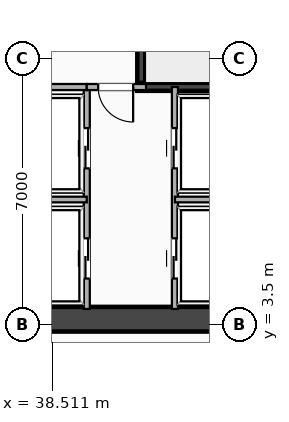
"""IFC4 building model, lengths in metres.
Left out: names, types, materials, properties, quantities, classifications, styles, units other than length and angle.
Written with IfcOpenShell. Run it as: python <this file> out.ifc"""

import sys

from ifc_helpers import new_model, si_unit, direction, frame, frame_2d, origin, place, context, subcontext, project, spatial, rectangle, extrude, element, fill, save


model = new_model("IFC4")
c1 = context("Model", 3, precision=1e-05, world=origin(), true_north=direction((0.0, 1.0)))
c2 = subcontext(c1, "Body", "Model", "MODEL_VIEW")
j1 = project(units=[si_unit("LENGTHUNIT", "METRE"), si_unit("PLANEANGLEUNIT", "RADIAN")], contexts=[c1])
p1 = place(None, origin())
s1 = spatial("IfcSite", under=j1, at=p1, CompositionType="ELEMENT")
p2 = place(p1, origin())
s2 = spatial("IfcBuilding", under=s1, at=p2, CompositionType="ELEMENT")
p3 = place(p2, origin())
s3 = spatial("IfcBuildingStorey", under=s2, at=p3, CompositionType="ELEMENT", Elevation=0.0)
p4 = place(p3, frame((20.3, 3.63, 0.0), z_axis=(0.0, 0.0, 1.0), x_axis=(1.0, 0.0, 0.0)))
e1 = element("IfcWall", 1, at=p4, inside=s3, PredefinedType="SHEAR", context=c2, shape_type="SweptSolid", body=[
    extrude(rectangle(XDim=24.5, YDim=0.65, at=frame_2d((12.25, 0.0))), origin(), (0.0, 0.0, 1.0), 5.1),
])
p5 = place(p4, frame((13.45, 0.0, 0.0), z_axis=(0.0, 0.0, 1.0), x_axis=(-1.0, 0.0, 0.0)))
e2 = element("IfcOpeningElement", 2, at=p5, cuts=e1, PredefinedType="OPENING", context=c2, shape_type="SweptSolid", body=[
    extrude(rectangle(XDim=1.1, YDim=2.15, at=frame_2d((0.55, 1.075))), frame((0.0, 0.335, 0.0), z_axis=(0.0, -1.0, 0.0), x_axis=(1.0, 0.0, 0.0)), (0.0, 0.0, 1.0), 0.67),
])
p6 = place(p3, frame((40.855, 9.745, 0.0), z_axis=(0.0, 0.0, 1.0), x_axis=(0.0, 1.0, 0.0)))
e3 = element("IfcWall", 3, at=p6, inside=s3, PredefinedType="SHEAR", context=c2, shape_type="SweptSolid", body=[
    extrude(rectangle(XDim=8.01, YDim=0.21, at=frame_2d((4.005, 0.0))), origin(), (0.0, 0.0, 1.0), 5.1),
])
p7 = place(p3, frame((40.75, 9.745, 0.0), z_axis=(0.0, 0.0, 1.0), x_axis=(1.0, 0.0, 0.0)))
e4 = element("IfcWall", 4, at=p7, inside=s3, PredefinedType="SHEAR", context=c2, shape_type="SweptSolid", body=[
    extrude(rectangle(XDim=3.66, YDim=0.21, at=frame_2d((1.83, 0.0))), origin(), (0.0, 0.0, 1.0), 5.1),
])
p8 = place(p3, frame((39.42, 3.9, 0.0), z_axis=(0.0, 0.0, 1.0), x_axis=(0.0, 1.0, 0.0)))
e5 = element("IfcWall", 5, at=p8, inside=s3, PredefinedType="PARTITIONING", context=c2, shape_type="SweptSolid", body=[
    extrude(rectangle(XDim=5.84, YDim=0.16, at=frame_2d((2.92, 0.0))), origin(), (0.0, 0.0, 1.0), 4.164),
])
p9 = place(p8, frame((1.86, 0.0, 0.0), z_axis=(0.0, 0.0, 1.0), x_axis=(-1.0, 0.0, 0.0)))
e6 = element("IfcOpeningElement", 6, at=p9, cuts=e5, PredefinedType="OPENING", context=c2, shape_type="SweptSolid", body=[
    extrude(rectangle(XDim=1.06, YDim=2.16, at=frame_2d((0.53, 1.08))), frame((0.0, 0.09, 0.0), z_axis=(0.0, -1.0, 0.0), x_axis=(1.0, 0.0, 0.0)), (0.0, 0.0, 1.0), 0.18),
])
p10 = place(p8, frame((4.76, 0.0, 0.0), z_axis=(0.0, 0.0, 1.0), x_axis=(-1.0, 0.0, 0.0)))
e7 = element("IfcOpeningElement", 7, at=p10, cuts=e5, PredefinedType="OPENING", context=c2, shape_type="SweptSolid", body=[
    extrude(rectangle(XDim=1.06, YDim=2.16, at=frame_2d((0.53, 1.08))), frame((0.0, 0.09, 0.0), z_axis=(0.0, -1.0, 0.0), x_axis=(1.0, 0.0, 0.0)), (0.0, 0.0, 1.0), 0.18),
])
p11 = place(p3, frame((41.74, 3.9, 0.0), z_axis=(0.0, 0.0, 1.0), x_axis=(0.0, 1.0, 0.0)))
e8 = element("IfcWall", 8, at=p11, inside=s3, PredefinedType="PARTITIONING", context=c2, shape_type="SweptSolid", body=[
    extrude(rectangle(XDim=5.84, YDim=0.16, at=frame_2d((2.92, 0.0))), origin(), (0.0, 0.0, 1.0), 4.164),
])
p12 = place(p11, frame((0.8, 0.0, 0.0)))
e9 = element("IfcOpeningElement", 9, at=p12, cuts=e8, PredefinedType="OPENING", context=c2, shape_type="SweptSolid", body=[
    extrude(rectangle(XDim=1.06, YDim=2.16, at=frame_2d((0.53, 1.08))), frame((0.0, 0.09, 0.0), z_axis=(0.0, -1.0, 0.0), x_axis=(1.0, 0.0, 0.0)), (0.0, 0.0, 1.0), 0.18),
])
p13 = place(p11, frame((3.7, 0.0, 0.0)))
e10 = element("IfcOpeningElement", 10, at=p13, cuts=e8, PredefinedType="OPENING", context=c2, shape_type="SweptSolid", body=[
    extrude(rectangle(XDim=1.06, YDim=2.16, at=frame_2d((0.53, 1.08))), frame((0.0, 0.09, 0.0), z_axis=(0.0, -1.0, 0.0), x_axis=(1.0, 0.0, 0.0)), (0.0, 0.0, 1.0), 0.18),
])
p14 = place(p3, frame((37.25, 6.78, 0.0), z_axis=(0.0, 0.0, 1.0), x_axis=(1.0, 0.0, 0.0)))
e11 = element("IfcWall", 11, at=p14, inside=s3, PredefinedType="PARTITIONING", context=c2, shape_type="SweptSolid", body=[
    extrude(rectangle(XDim=2.17, YDim=0.15, at=frame_2d((1.085, 0.0))), origin(), (0.0, 0.0, 1.0), 4.23),
])
p15 = place(p3, frame((41.74, 6.78, 0.0), z_axis=(0.0, 0.0, 1.0), x_axis=(1.0, 0.0, 0.0)))
e12 = element("IfcWall", 12, at=p15, inside=s3, PredefinedType="PARTITIONING", context=c2, shape_type="SweptSolid", body=[
    extrude(rectangle(XDim=2.66, YDim=0.15, at=frame_2d((1.33, 0.0))), origin(), (0.0, 0.0, 1.0), 4.23),
])
p16 = place(p3, frame((37.25, 9.74, 0.0), z_axis=(0.0, 0.0, 1.0), x_axis=(1.0, 0.0, 0.0)))
e13 = element("IfcWall", 13, at=p16, inside=s3, PredefinedType="PARTITIONING", context=c2, shape_type="SweptSolid", body=[
    extrude(rectangle(XDim=2.17, YDim=0.16, at=frame_2d((1.085, 0.0))), origin(), (0.0, 0.0, 1.0), 4.23),
])
p17 = place(p3, frame((39.42, 9.74, 0.0), z_axis=(0.0, 0.0, 1.0), x_axis=(1.0, 0.0, 0.0)))
e14 = element("IfcWall", 14, at=p17, inside=s3, PredefinedType="PARTITIONING", context=c2, shape_type="SweptSolid", body=[
    extrude(rectangle(XDim=1.56, YDim=0.16, at=frame_2d((0.78, 0.0))), origin(), (0.0, 0.0, 1.0), 5.1),
])
p18 = place(p17, frame((0.3, 0.0, 0.0)))
e15 = element("IfcOpeningElement", 15, at=p18, cuts=e14, PredefinedType="OPENING", context=c2, shape_type="SweptSolid", body=[
    extrude(rectangle(XDim=0.92, YDim=2.08, at=frame_2d((0.46, 1.04))), frame((0.0, 0.09, 0.0), z_axis=(0.0, -1.0, 0.0), x_axis=(1.0, 0.0, 0.0)), (0.0, 0.0, 1.0), 0.18),
])
p19 = place(p9, origin())
e16 = element("IfcDoor", 16, at=p19, inside=s3, OperationType="DOUBLE_DOOR_SLIDING", PredefinedType="DOOR", context=c2, shape_type="SweptSolid", body=[
    extrude(rectangle(XDim=1.06, YDim=2.16, at=frame_2d((0.53, 1.08))), frame((0.0, 0.025, 0.0), z_axis=(0.0, -1.0, 0.0), x_axis=(1.0, 0.0, 0.0)), (0.0, 0.0, 1.0), 0.05),
])
fill(e6, e16)
p20 = place(p10, origin())
e17 = element("IfcDoor", 17, at=p20, inside=s3, OperationType="DOUBLE_DOOR_SLIDING", PredefinedType="DOOR", context=c2, shape_type="SweptSolid", body=[
    extrude(rectangle(XDim=1.06, YDim=2.16, at=frame_2d((0.53, 1.08))), frame((0.0, 0.025, 0.0), z_axis=(0.0, -1.0, 0.0), x_axis=(1.0, 0.0, 0.0)), (0.0, 0.0, 1.0), 0.05),
])
fill(e7, e17)
p21 = place(p12, origin())
e18 = element("IfcDoor", 18, at=p21, inside=s3, OperationType="DOUBLE_DOOR_SLIDING", PredefinedType="DOOR", context=c2, shape_type="SweptSolid", body=[
    extrude(rectangle(XDim=1.06, YDim=2.16, at=frame_2d((0.53, 1.08))), frame((0.0, 0.025, 0.0), z_axis=(0.0, -1.0, 0.0), x_axis=(1.0, 0.0, 0.0)), (0.0, 0.0, 1.0), 0.05),
])
fill(e9, e18)
p22 = place(p13, origin())
e19 = element("IfcDoor", 19, at=p22, inside=s3, OperationType="DOUBLE_DOOR_SLIDING", PredefinedType="DOOR", context=c2, shape_type="SweptSolid", body=[
    extrude(rectangle(XDim=1.06, YDim=2.16, at=frame_2d((0.53, 1.08))), frame((0.0, 0.025, 0.0), z_axis=(0.0, -1.0, 0.0), x_axis=(1.0, 0.0, 0.0)), (0.0, 0.0, 1.0), 0.05),
])
fill(e10, e19)
p23 = place(p18, origin())
e20 = element("IfcDoor", 20, at=p23, inside=s3, OperationType="SINGLE_SWING_RIGHT", PredefinedType="DOOR", context=c2, shape_type="SweptSolid", body=[
    extrude(rectangle(XDim=0.92, YDim=2.08, at=frame_2d((0.46, 1.04))), frame((0.0, 0.025, 0.0), z_axis=(0.0, -1.0, 0.0), x_axis=(1.0, 0.0, 0.0)), (0.0, 0.0, 1.0), 0.05),
])
fill(e15, e20)
save(model, sys.argv[1])
